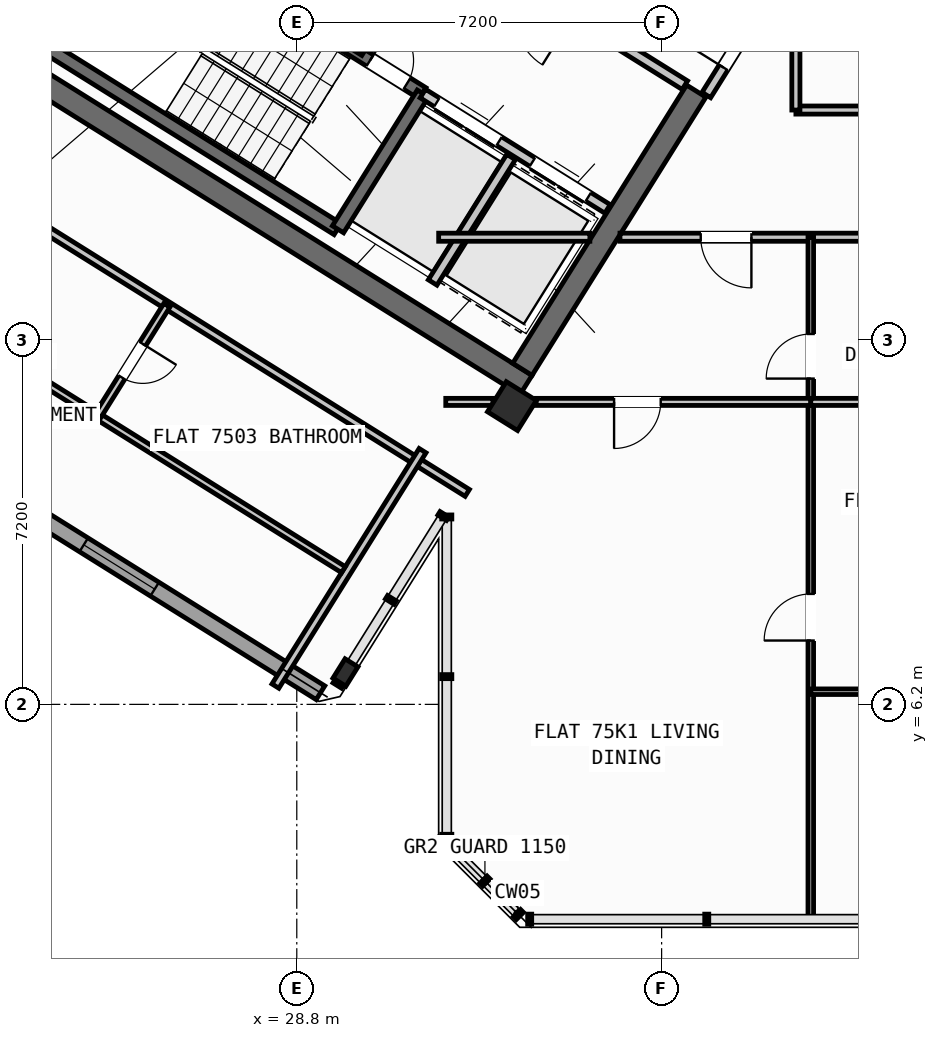
"""IFC4 building model, lengths in metres.
Left out: names, types, materials, properties, quantities, classifications, styles, units other than length and angle.
Written with IfcOpenShell. Run it as: python <this file> out.ifc"""

import sys

from ifc_helpers import new_model, si_unit, direction, frame, frame_2d, origin, origin_2d, place, context, subcontext, project, spatial, rectangle, hollow_rectangle, i_section, extrude, source, transform, mapped, element, fill, save


model = new_model("IFC4")
c1 = context("Model", 3, precision=1e-05, world=origin(), true_north=direction((0.0, 1.0)))
c2 = subcontext(c1, "Body", "Model", "MODEL_VIEW")
j1 = project(units=[si_unit("LENGTHUNIT", "METRE"), si_unit("PLANEANGLEUNIT", "RADIAN")], contexts=[c1])
p1 = place(None, origin())
s1 = spatial("IfcSite", under=j1, at=p1, CompositionType="ELEMENT")
p2 = place(p1, origin())
s2 = spatial("IfcBuilding", under=s1, at=p2, CompositionType="ELEMENT")
p3 = place(p2, frame((0.0, 0.0, 295.2)))
s3 = spatial("IfcBuildingStorey", under=s2, at=p3, CompositionType="ELEMENT", Elevation=295.2)
p4 = place(p3, frame((33.324, 12.503, 0.0), z_axis=(0.0, 0.0, 1.0), x_axis=(-0.848043529849, 0.529926571782, 0.0)))
e1 = element("IfcWall", 1, at=p4, inside=s3, PredefinedType="SHEAR", context=c2, shape_type="SweptSolid", body=[
    extrude(rectangle(XDim=13.04, YDim=0.45, at=frame_2d((6.52, 0.0))), origin(), (0.0, 0.0, 1.0), 3.32),
])
p5 = place(p3, frame((36.683, 18.304, 0.0), z_axis=(0.0, 0.0, 1.0), x_axis=(-0.529904039071, -0.848057609704, 0.0)))
e2 = element("IfcWall", 2, at=p5, inside=s3, PredefinedType="SHEAR", context=c2, shape_type="SweptSolid", body=[
    extrude(rectangle(XDim=6.475, YDim=0.45, at=frame_2d((3.238, 0.0))), origin(), (0.0, 0.0, 1.0), 3.32),
])
m1 = source(origin(), c2, "Body", "SweptSolid", [
    extrude(hollow_rectangle(XDim=0.7, YDim=0.7, WallThickness=0.028, at=origin_2d()), origin(), (0.0, 0.0, 1.0), 3.6),
])
p6 = place(p3, frame((33.046, 12.087, 0.0), z_axis=(0.0, 0.0, 1.0), x_axis=(-0.848048096156, 0.529919264233, 0.0)))
e3 = element("IfcColumn", 3, at=p6, inside=s3, PredefinedType="COLUMN", context=c2, shape_type="MappedRepresentation", body=[
    mapped(m1, transform((0.0, 0.0, 0.0), scale=1.0)),
])
m2 = source(origin(), c2, "Body", "SweptSolid", [
    extrude(i_section(OverallWidth=0.3, OverallDepth=0.45, WebThickness=0.014, FlangeThickness=0.026, at=origin_2d()), origin(), (0.0, 0.0, 1.0), 3.6),
])
p7 = place(p3, frame((29.761, 6.829, 0.0), z_axis=(0.0, 0.0, 1.0), x_axis=(-0.848048096156, 0.529919264233, 0.0)))
e4 = element("IfcColumn", 4, at=p7, inside=s3, PredefinedType="COLUMN", context=c2, shape_type="MappedRepresentation", body=[
    mapped(m2, transform((0.0, 0.0, 0.0), scale=1.0)),
])
p8 = place(p3, frame((29.268, 6.429, 0.0), z_axis=(0.0, 0.0, 1.0), x_axis=(-0.848048398186, 0.529918780885, 0.0)))
e5 = element("IfcWall", 5, at=p8, inside=s3, PredefinedType="STANDARD", context=c2, shape_type="SweptSolid", body=[
    extrude(rectangle(XDim=25.188, YDim=0.32, at=frame_2d((12.594, 0.0))), origin(), (0.0, 0.0, 1.0), 3.32),
])
p9 = place(p8, frame((16.362, 0.0, 0.0)))
e6 = element("IfcOpeningElement", 6, at=p9, cuts=e5, PredefinedType="OPENING", context=c2, shape_type="SweptSolid", body=[
    extrude(rectangle(XDim=1.2, YDim=2.15, at=frame_2d((0.6, 1.075))), frame((0.0, 0.17, 0.0), z_axis=(0.0, -1.0, 0.0), x_axis=(1.0, 0.0, 0.0)), (0.0, 0.0, 1.0), 0.34),
])
p10 = place(p8, frame((3.859, 0.0, 0.9)))
e7 = element("IfcOpeningElement", 7, at=p10, cuts=e5, PredefinedType="OPENING", context=c2, shape_type="SweptSolid", body=[
    extrude(rectangle(XDim=1.65, YDim=1.45, at=frame_2d((0.825, 0.725))), frame((0.0, 0.17, 0.0), z_axis=(0.0, -1.0, 0.0), x_axis=(1.0, 0.0, 0.0)), (0.0, 0.0, 1.0), 0.34),
])
p11 = place(p8, frame((10.519, 0.0, 0.9)))
e8 = element("IfcOpeningElement", 8, at=p11, cuts=e5, PredefinedType="OPENING", context=c2, shape_type="SweptSolid", body=[
    extrude(rectangle(XDim=1.65, YDim=1.45, at=frame_2d((0.825, 0.725))), frame((0.0, 0.17, 0.0), z_axis=(0.0, -1.0, 0.0), x_axis=(1.0, 0.0, 0.0)), (0.0, 0.0, 1.0), 0.34),
])
p12 = place(p8, frame((21.156, 0.0, 0.95)))
e9 = element("IfcOpeningElement", 9, at=p12, cuts=e5, PredefinedType="OPENING", context=c2, shape_type="SweptSolid", body=[
    extrude(rectangle(XDim=1.95, YDim=1.35, at=frame_2d((0.975, 0.675))), frame((0.0, 0.17, 0.0), z_axis=(0.0, -1.0, 0.0), x_axis=(1.0, 0.0, 0.0)), (0.0, 0.0, 1.0), 0.34),
])
p13 = place(p3, frame((29.605, 15.581, 0.0), z_axis=(0.0, 0.0, 1.0), x_axis=(-0.848036911448, 0.529937163087, 0.0)))
e10 = element("IfcWall", 10, at=p13, inside=s3, PredefinedType="SHEAR", context=c2, shape_type="SweptSolid", body=[
    extrude(rectangle(XDim=7.46, YDim=0.26, at=frame_2d((3.73, 0.0))), origin(), (0.0, 0.0, 1.0), 3.32),
])
p14 = place(p3, frame((31.28, 18.261, 0.0), z_axis=(0.0, 0.0, 1.0), x_axis=(-0.848051618787, 0.529913626805, 0.0)))
e11 = element("IfcWall", 11, at=p14, inside=s3, PredefinedType="SHEAR", context=c2, shape_type="SweptSolid", body=[
    extrude(rectangle(XDim=7.46, YDim=0.26, at=frame_2d((3.73, 0.0))), origin(), (0.0, 0.0, 1.0), 3.32),
])
p15 = place(p14, frame((0.36, 0.0, 0.0)))
e12 = element("IfcOpeningElement", 12, at=p15, cuts=e11, PredefinedType="OPENING", context=c2, shape_type="SweptSolid", body=[
    extrude(rectangle(XDim=0.86, YDim=2.05, at=frame_2d((0.43, 1.025))), frame((0.0, 0.14, 0.0), z_axis=(0.0, -1.0, 0.0), x_axis=(1.0, 0.0, 0.0)), (0.0, 0.0, 1.0), 0.28),
])
p16 = place(p3, frame((31.288, 18.256, 0.0), z_axis=(0.0, 0.0, 1.0), x_axis=(-0.529943379326, -0.848033026897, 0.0)))
e13 = element("IfcWall", 13, at=p16, inside=s3, PredefinedType="SHEAR", context=c2, shape_type="SweptSolid", body=[
    extrude(rectangle(XDim=3.16, YDim=0.26, at=frame_2d((1.58, 0.0))), origin(), (0.0, 0.0, 1.0), 3.32),
])
p17 = place(p3, frame((34.933, 15.978, 0.0), z_axis=(0.0, 0.0, 1.0), x_axis=(-0.848055739377, 0.529907032327, 0.0)))
e14 = element("IfcWall", 14, at=p17, inside=s3, PredefinedType="STANDARD", context=c2, shape_type="SweptSolid", body=[
    extrude(rectangle(XDim=4.298, YDim=0.2, at=frame_2d((2.149, 0.0))), origin(), (0.0, 0.0, 1.0), 3.31),
])
p18 = place(p17, frame((0.448, 0.0, 0.0)))
e15 = element("IfcOpeningElement", 15, at=p18, cuts=e14, PredefinedType="OPENING", context=c2, shape_type="SweptSolid", body=[
    extrude(rectangle(XDim=1.3, YDim=2.2, at=frame_2d((0.65, 1.1))), frame((0.0, 0.11, 0.0), z_axis=(0.0, -1.0, 0.0), x_axis=(1.0, 0.0, 0.0)), (0.0, 0.0, 1.0), 0.22),
])
p19 = place(p17, frame((2.523, 0.0, 0.0)))
e16 = element("IfcOpeningElement", 16, at=p19, cuts=e14, PredefinedType="OPENING", context=c2, shape_type="SweptSolid", body=[
    extrude(rectangle(XDim=1.45, YDim=2.25, at=frame_2d((0.725, 1.125))), frame((0.0, 0.11, 0.0), z_axis=(0.0, -1.0, 0.0), x_axis=(1.0, 0.0, 0.0)), (0.0, 0.0, 1.0), 0.22),
])
p20 = place(p3, frame((36.459, 18.421, 0.0), z_axis=(0.0, 0.0, 1.0), x_axis=(-0.848059591691, 0.529900867089, 0.0)))
e17 = element("IfcWall", 17, at=p20, inside=s3, PredefinedType="STANDARD", context=c2, shape_type="SweptSolid", body=[
    extrude(rectangle(XDim=5.818, YDim=0.2, at=frame_2d((2.909, 0.0))), origin(), (0.0, 0.0, 1.0), 3.31),
])
p21 = place(p20, frame((2.598, 0.0, 0.0)))
e18 = element("IfcOpeningElement", 18, at=p21, cuts=e17, PredefinedType="OPENING", context=c2, shape_type="SweptSolid", body=[
    extrude(rectangle(XDim=1.15, YDim=2.1, at=frame_2d((0.575, 1.05))), frame((0.0, 0.11, 0.0), z_axis=(0.0, -1.0, 0.0), x_axis=(1.0, 0.0, 0.0)), (0.0, 0.0, 1.0), 0.22),
])
p22 = place(p3, frame((33.029, 17.003, 0.0), z_axis=(0.0, 0.0, 1.0), x_axis=(-0.529916267533, -0.848049968695, 0.0)))
e19 = element("IfcWall", 19, at=p22, inside=s3, PredefinedType="STANDARD", context=c2, shape_type="SweptSolid", body=[
    extrude(rectangle(XDim=2.92, YDim=0.2, at=frame_2d((1.46, 0.0))), origin(), (0.0, 0.0, 1.0), 3.31),
])
p23 = place(p3, frame((31.525, 21.504, 0.0), z_axis=(0.0, 0.0, 1.0), x_axis=(-0.529907497854, -0.848055448493, 0.0)))
e20 = element("IfcWall", 20, at=p23, inside=s3, PredefinedType="STANDARD", context=c2, shape_type="SweptSolid", body=[
    extrude(rectangle(XDim=2.88, YDim=0.2, at=frame_2d((1.44, 0.0))), origin(), (0.0, 0.0, 1.0), 3.31),
])
p24 = place(p3, frame((32.164, 10.374, 0.0), z_axis=(0.0, 0.0, 1.0), x_axis=(-0.848044107957, 0.529925646633, 0.0)))
e21 = element("IfcWall", 21, at=p24, inside=s3, PredefinedType="PARTITIONING", context=c2, shape_type="SweptSolid", body=[
    extrude(rectangle(XDim=15.57, YDim=0.16, at=frame_2d((7.785, 0.0))), origin(), (0.0, 0.0, 1.0), 3.31),
])
p25 = place(p24, frame((10.83, 0.0, 0.0)))
e22 = element("IfcOpeningElement", 22, at=p25, cuts=e21, PredefinedType="OPENING", context=c2, shape_type="SweptSolid", body=[
    extrude(rectangle(XDim=1.0, YDim=2.1, at=frame_2d((0.5, 1.05))), frame((0.0, 0.09, 0.0), z_axis=(0.0, -1.0, 0.0), x_axis=(1.0, 0.0, 0.0)), (0.0, 0.0, 1.0), 0.18),
])
p26 = place(p3, frame((31.282, 11.208, 0.0), z_axis=(0.0, 0.0, 1.0), x_axis=(-0.529938869374, -0.84803584519, 0.0)))
e23 = element("IfcWall", 23, at=p26, inside=s3, PredefinedType="PARTITIONING", context=c2, shape_type="SweptSolid", body=[
    extrude(rectangle(XDim=5.48, YDim=0.16, at=frame_2d((2.74, 0.0))), origin(), (0.0, 0.0, 1.0), 3.31),
])
p27 = place(p3, frame((29.72, 8.859, 0.0), z_axis=(0.0, 0.0, 1.0), x_axis=(-0.848049134363, 0.529917602752, 0.0)))
e24 = element("IfcWall", 24, at=p27, inside=s3, PredefinedType="PLUMBINGWALL", context=c2, shape_type="SweptSolid", body=[
    extrude(rectangle(XDim=14.3, YDim=0.14, at=frame_2d((7.15, 0.0))), origin(), (0.0, 0.0, 1.0), 3.31),
])
p28 = place(p27, frame((9.57, 0.0, 0.0)))
e25 = element("IfcOpeningElement", 25, at=p28, cuts=e24, PredefinedType="OPENING", context=c2, shape_type="SweptSolid", body=[
    extrude(rectangle(XDim=0.92, YDim=2.08, at=frame_2d((0.46, 1.04))), frame((0.0, 0.08, 0.0), z_axis=(0.0, -1.0, 0.0), x_axis=(1.0, 0.0, 0.0)), (0.0, 0.0, 1.0), 0.16),
])
p29 = place(p3, frame((26.237, 14.078, 0.0), z_axis=(0.0, 0.0, 1.0), x_axis=(-0.52995640672, -0.848024885824, 0.0)))
e26 = element("IfcWall", 26, at=p29, inside=s3, PredefinedType="PLUMBINGWALL", context=c2, shape_type="SweptSolid", body=[
    extrude(rectangle(XDim=2.58, YDim=0.14, at=frame_2d((1.29, 0.0))), origin(), (0.0, 0.0, 1.0), 3.31),
])
p30 = place(p29, frame((0.9, 0.0, 0.0)))
e27 = element("IfcOpeningElement", 27, at=p30, cuts=e26, PredefinedType="OPENING", context=c2, shape_type="SweptSolid", body=[
    extrude(rectangle(XDim=0.78, YDim=2.05, at=frame_2d((0.39, 1.025))), frame((0.0, 0.08, 0.0), z_axis=(0.0, -1.0, 0.0), x_axis=(1.0, 0.0, 0.0)), (0.0, 0.0, 1.0), 0.16),
])
p31 = place(p3, frame((38.451, 20.737, 0.0), z_axis=(0.0, 0.0, 1.0), x_axis=(-0.529924799939, -0.848044637038, 0.0)))
e28 = element("IfcWall", 28, at=p31, inside=s3, PredefinedType="STANDARD", context=c2, shape_type="SweptSolid", body=[
    extrude(rectangle(XDim=2.96, YDim=0.2, at=frame_2d((1.48, 0.0))), origin(), (0.0, 0.0, 1.0), 3.31),
])
p32 = place(p31, frame((1.46, 0.0, 0.0)))
e29 = element("IfcOpeningElement", 29, at=p32, cuts=e28, PredefinedType="OPENING", context=c2, shape_type="SweptSolid", body=[
    extrude(rectangle(XDim=0.86, YDim=2.05, at=frame_2d((0.43, 1.025))), frame((0.0, 0.11, 0.0), z_axis=(0.0, -1.0, 0.0), x_axis=(1.0, 0.0, 0.0)), (0.0, 0.0, 1.0), 0.22),
])
p33 = place(p3, frame((31.6, 15.42, 0.0), z_axis=(0.0, 0.0, 1.0), x_axis=(1.0, 0.0, 0.0)))
e30 = element("IfcWall", 30, at=p33, inside=s3, PredefinedType="PARTITIONING", context=c2, shape_type="SweptSolid", body=[
    extrude(rectangle(XDim=2.984, YDim=0.16, at=frame_2d((1.492, 0.0))), origin(), (0.0, 0.0, 1.0), 3.31),
])
p34 = place(p3, frame((35.178, 15.42, 0.0), z_axis=(0.0, 0.0, 1.0), x_axis=(1.0, 0.0, 0.0)))
e31 = element("IfcWall", 31, at=p34, inside=s3, PredefinedType="PARTITIONING", context=c2, shape_type="SweptSolid", body=[
    extrude(rectangle(XDim=9.021, YDim=0.16, at=frame_2d((4.511, 0.0))), origin(), (0.0, 0.0, 1.0), 3.31),
])
p35 = place(p34, frame((1.594, 0.0, 0.0)))
e32 = element("IfcOpeningElement", 32, at=p35, cuts=e31, PredefinedType="OPENING", context=c2, shape_type="SweptSolid", body=[
    extrude(rectangle(XDim=1.0, YDim=2.1, at=frame_2d((0.5, 1.05))), frame((0.0, 0.09, 0.0), z_axis=(0.0, -1.0, 0.0), x_axis=(1.0, 0.0, 0.0)), (0.0, 0.0, 1.0), 0.18),
])
p36 = place(p3, frame((38.65, 17.93, 0.0), z_axis=(0.0, 0.0, 1.0), x_axis=(1.0, 0.0, 0.0)))
e33 = element("IfcWall", 33, at=p36, inside=s3, PredefinedType="PARTITIONING", context=c2, shape_type="SweptSolid", body=[
    extrude(rectangle(XDim=4.15, YDim=0.16, at=frame_2d((2.075, 0.0))), origin(), (0.0, 0.0, 1.0), 3.31),
])
p37 = place(p36, frame((1.575, 0.0, 0.0)))
e34 = element("IfcOpeningElement", 34, at=p37, cuts=e33, PredefinedType="OPENING", context=c2, shape_type="SweptSolid", body=[
    extrude(rectangle(XDim=1.0, YDim=2.1, at=frame_2d((0.5, 1.05))), frame((0.0, 0.09, 0.0), z_axis=(0.0, -1.0, 0.0), x_axis=(1.0, 0.0, 0.0)), (0.0, 0.0, 1.0), 0.18),
])
p38 = place(p3, frame((38.65, 17.93, 0.0), z_axis=(0.0, 0.0, 1.0), x_axis=(0.0, 1.0, 0.0)))
e35 = element("IfcWall", 35, at=p38, inside=s3, PredefinedType="PARTITIONING", context=c2, shape_type="SweptSolid", body=[
    extrude(rectangle(XDim=3.046, YDim=0.16, at=frame_2d((1.523, 0.0))), origin(), (0.0, 0.0, 1.0), 3.31),
])
p39 = place(p3, frame((38.944, 1.96, 0.0), z_axis=(0.0, 0.0, 1.0), x_axis=(0.0, 1.0, 0.0)))
e36 = element("IfcWall", 36, at=p39, inside=s3, PredefinedType="PARTITIONING", context=c2, shape_type="SweptSolid", body=[
    extrude(rectangle(XDim=13.46, YDim=0.11, at=frame_2d((6.73, 0.0))), origin(), (0.0, 0.0, 1.0), 3.31),
])
p40 = place(p39, frame((5.5, 0.0, 0.0)))
e37 = element("IfcOpeningElement", 37, at=p40, cuts=e36, PredefinedType="OPENING", context=c2, shape_type="SweptSolid", body=[
    extrude(rectangle(XDim=0.92, YDim=2.08, at=frame_2d((0.46, 1.04))), frame((0.0, 0.065, 0.0), z_axis=(0.0, -1.0, 0.0), x_axis=(1.0, 0.0, 0.0)), (0.0, 0.0, 1.0), 0.13),
])
p41 = place(p39, frame((10.67, 0.0, 0.0)))
e38 = element("IfcOpeningElement", 38, at=p41, cuts=e36, PredefinedType="OPENING", context=c2, shape_type="SweptSolid", body=[
    extrude(rectangle(XDim=0.88, YDim=2.08, at=frame_2d((0.44, 1.04))), frame((0.0, 0.065, 0.0), z_axis=(0.0, -1.0, 0.0), x_axis=(1.0, 0.0, 0.0)), (0.0, 0.0, 1.0), 0.13),
])
p42 = place(p3, frame((31.74, 12.17, 0.0), z_axis=(0.0, 0.0, 1.0), x_axis=(1.0, 0.0, 0.0)))
e39 = element("IfcWall", 39, at=p42, inside=s3, PredefinedType="PLUMBINGWALL", context=c2, shape_type="SweptSolid", body=[
    extrude(rectangle(XDim=0.931, YDim=0.14, at=frame_2d((0.466, 0.0))), origin(), (0.0, 0.0, 1.0), 3.31),
])
p43 = place(p3, frame((33.525, 12.17, 0.0), z_axis=(0.0, 0.0, 1.0), x_axis=(1.0, 0.0, 0.0)))
e40 = element("IfcWall", 40, at=p43, inside=s3, PredefinedType="PLUMBINGWALL", context=c2, shape_type="SweptSolid", body=[
    extrude(rectangle(XDim=5.419, YDim=0.14, at=frame_2d((2.709, 0.0))), origin(), (0.0, 0.0, 1.0), 3.31),
])
p44 = place(p43, frame((1.537, 0.0, 0.0)))
e41 = element("IfcOpeningElement", 41, at=p44, cuts=e40, PredefinedType="OPENING", context=c2, shape_type="SweptSolid", body=[
    extrude(rectangle(XDim=0.92, YDim=2.08, at=frame_2d((0.46, 1.04))), frame((0.0, 0.08, 0.0), z_axis=(0.0, -1.0, 0.0), x_axis=(1.0, 0.0, 0.0)), (0.0, 0.0, 1.0), 0.16),
])
p45 = place(p3, frame((38.944, 12.17, 0.0), z_axis=(0.0, 0.0, 1.0), x_axis=(1.0, 0.0, 0.0)))
e42 = element("IfcWall", 42, at=p45, inside=s3, PredefinedType="PLUMBINGWALL", context=c2, shape_type="SweptSolid", body=[
    extrude(rectangle(XDim=5.116, YDim=0.14, at=frame_2d((2.558, 0.0))), origin(), (0.0, 0.0, 1.0), 3.31),
])
p46 = place(p3, frame((38.944, 6.45, 0.0), z_axis=(0.0, 0.0, 1.0), x_axis=(1.0, 0.0, 0.0)))
e43 = element("IfcWall", 43, at=p46, inside=s3, PredefinedType="PARTITIONING", context=c2, shape_type="SweptSolid", body=[
    extrude(rectangle(XDim=5.116, YDim=0.11, at=frame_2d((2.558, 0.0))), origin(), (0.0, 0.0, 1.0), 3.31),
])
p47 = place(p46, frame((2.018, 0.0, 0.0)))
e44 = element("IfcOpeningElement", 44, at=p47, cuts=e43, PredefinedType="OPENING", context=c2, shape_type="SweptSolid", body=[
    extrude(rectangle(XDim=0.92, YDim=2.08, at=frame_2d((0.46, 1.04))), frame((0.0, 0.065, 0.0), z_axis=(0.0, -1.0, 0.0), x_axis=(1.0, 0.0, 0.0)), (0.0, 0.0, 1.0), 0.13),
])
m3 = source(origin(), c2, "Body", "SweptSolid", [
    extrude(rectangle(XDim=1.65, YDim=1.45, at=frame_2d((0.825, 0.725))), frame((0.0, 0.03, 0.0), z_axis=(0.0, -1.0, 0.0), x_axis=(1.0, 0.0, 0.0)), (0.0, 0.0, 1.0), 0.06),
])
p48 = place(p10, origin())
e45 = element("IfcWindow", 45, at=p48, inside=s3, PartitioningType="SINGLE_PANEL", PredefinedType="WINDOW", context=c2, shape_type="MappedRepresentation", body=[
    mapped(m3, transform((0.0, 0.0, 0.0), scale=1.0)),
])
fill(e7, e45)
m4 = source(origin(), c2, "Body", "SweptSolid", [
    extrude(rectangle(XDim=0.86, YDim=2.05, at=frame_2d((0.43, 1.025))), frame((0.0, 0.025, 0.0), z_axis=(0.0, -1.0, 0.0), x_axis=(1.0, 0.0, 0.0)), (0.0, 0.0, 1.0), 0.05),
])
p49 = place(p15, frame((0.86, 0.0, 0.0), z_axis=(0.0, 0.0, 1.0), x_axis=(-1.0, 0.0, 0.0)))
e46 = element("IfcDoor", 46, at=p49, inside=s3, OperationType="SINGLE_SWING_LEFT", PredefinedType="DOOR", context=c2, shape_type="MappedRepresentation", body=[
    mapped(m4, transform((0.0, 0.0, 0.0), scale=1.0)),
])
fill(e12, e46)
m5 = source(origin(), c2, "Body", "SweptSolid", [
    extrude(rectangle(XDim=1.3, YDim=2.2, at=frame_2d((0.65, 1.1))), frame((0.0, 0.025, 0.0), z_axis=(0.0, -1.0, 0.0), x_axis=(1.0, 0.0, 0.0)), (0.0, 0.0, 1.0), 0.05),
])
p50 = place(p18, origin())
e47 = element("IfcDoor", 47, at=p50, inside=s3, OperationType="DOUBLE_DOOR_SLIDING", PredefinedType="DOOR", context=c2, shape_type="MappedRepresentation", body=[
    mapped(m5, transform((0.0, 0.0, 0.0), scale=1.0)),
])
fill(e15, e47)
m6 = source(origin(), c2, "Body", "SweptSolid", [
    extrude(rectangle(XDim=1.45, YDim=2.25, at=frame_2d((0.725, 1.125))), frame((0.0, 0.025, 0.0), z_axis=(0.0, -1.0, 0.0), x_axis=(1.0, 0.0, 0.0)), (0.0, 0.0, 1.0), 0.05),
])
p51 = place(p19, origin())
e48 = element("IfcDoor", 48, at=p51, inside=s3, OperationType="DOUBLE_DOOR_SLIDING", PredefinedType="DOOR", context=c2, shape_type="MappedRepresentation", body=[
    mapped(m6, transform((0.0, 0.0, 0.0), scale=1.0)),
])
fill(e16, e48)
m7 = source(origin(), c2, "Body", "SweptSolid", [
    extrude(rectangle(XDim=0.78, YDim=2.05, at=frame_2d((0.39, 1.025))), frame((0.0, 0.025, 0.0), z_axis=(0.0, -1.0, 0.0), x_axis=(1.0, 0.0, 0.0)), (0.0, 0.0, 1.0), 0.05),
])
p52 = place(p30, origin())
e49 = element("IfcDoor", 49, at=p52, inside=s3, OperationType="SINGLE_SWING_LEFT", PredefinedType="DOOR", context=c2, shape_type="MappedRepresentation", body=[
    mapped(m7, transform((0.0, 0.0, 0.0), scale=1.0)),
])
fill(e27, e49)
p53 = place(p32, frame((0.86, 0.0, 0.0), z_axis=(0.0, 0.0, 1.0), x_axis=(-1.0, 0.0, 0.0)))
e50 = element("IfcDoor", 50, at=p53, inside=s3, OperationType="SINGLE_SWING_LEFT", PredefinedType="DOOR", context=c2, shape_type="MappedRepresentation", body=[
    mapped(m4, transform((0.0, 0.0, 0.0), scale=1.0)),
])
fill(e29, e50)
m8 = source(origin(), c2, "Body", "SweptSolid", [
    extrude(rectangle(XDim=0.92, YDim=2.08, at=frame_2d((0.46, 1.04))), frame((0.0, 0.025, 0.0), z_axis=(0.0, -1.0, 0.0), x_axis=(1.0, 0.0, 0.0)), (0.0, 0.0, 1.0), 0.05),
])
p54 = place(p40, origin())
e51 = element("IfcDoor", 51, at=p54, inside=s3, OperationType="SINGLE_SWING_LEFT", PredefinedType="DOOR", context=c2, shape_type="MappedRepresentation", body=[
    mapped(m8, transform((0.0, 0.0, 0.0), scale=1.0)),
])
fill(e37, e51)
m9 = source(origin(), c2, "Body", "SweptSolid", [
    extrude(rectangle(XDim=1.0, YDim=2.1, at=frame_2d((0.5, 1.05))), frame((0.0, 0.025, 0.0), z_axis=(0.0, -1.0, 0.0), x_axis=(1.0, 0.0, 0.0)), (0.0, 0.0, 1.0), 0.05),
])
p55 = place(p35, frame((1.0, 0.0, 0.0), z_axis=(0.0, 0.0, 1.0), x_axis=(-1.0, 0.0, 0.0)))
e52 = element("IfcDoor", 52, at=p55, inside=s3, OperationType="SINGLE_SWING_LEFT", PredefinedType="DOOR", context=c2, shape_type="MappedRepresentation", body=[
    mapped(m9, transform((0.0, 0.0, 0.0), scale=1.0)),
])
fill(e32, e52)
p56 = place(p44, frame((0.92, 0.0, 0.0), z_axis=(0.0, 0.0, 1.0), x_axis=(-1.0, 0.0, 0.0)))
e53 = element("IfcDoor", 53, at=p56, inside=s3, OperationType="SINGLE_SWING_RIGHT", PredefinedType="DOOR", context=c2, shape_type="MappedRepresentation", body=[
    mapped(m8, transform((0.0, 0.0, 0.0), scale=1.0)),
])
fill(e41, e53)
m10 = source(origin(), c2, "Body", "SweptSolid", [
    extrude(rectangle(XDim=0.88, YDim=2.08, at=frame_2d((0.44, 1.04))), frame((0.0, 0.025, 0.0), z_axis=(0.0, -1.0, 0.0), x_axis=(1.0, 0.0, 0.0)), (0.0, 0.0, 1.0), 0.05),
])
p57 = place(p41, origin())
e54 = element("IfcDoor", 54, at=p57, inside=s3, OperationType="SINGLE_SWING_LEFT", PredefinedType="DOOR", context=c2, shape_type="MappedRepresentation", body=[
    mapped(m10, transform((0.0, 0.0, 0.0), scale=1.0)),
])
fill(e38, e54)
save(model, sys.argv[1])
